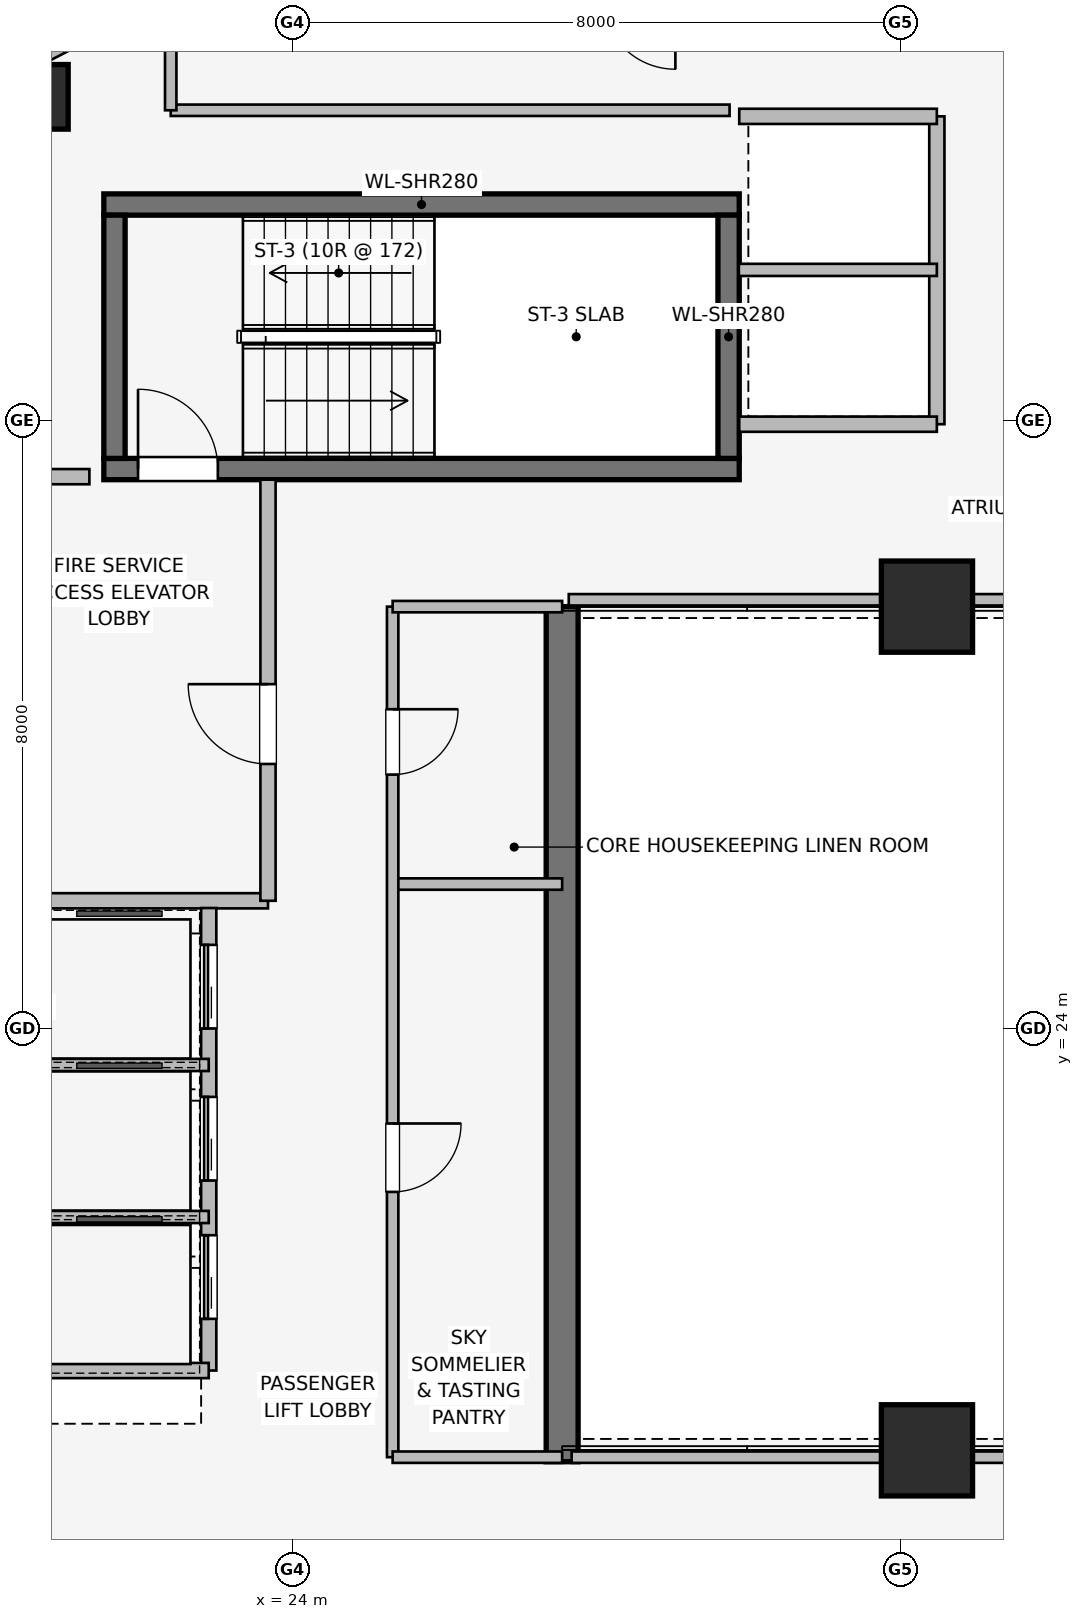
"""IFC4 building model, lengths in metres.
Left out: names, types, materials, properties, quantities, classifications, styles, units other than length and angle.
Written with IfcOpenShell. Run it as: python <this file> out.ifc"""

import sys

from ifc_helpers import new_model, si_unit, direction, frame, frame_2d, origin, origin_2d, place, context, subcontext, project, spatial, rectangle, extrude, element, fill, save


model = new_model("IFC4")
c1 = context("Model", 3, precision=1e-05, world=origin(), true_north=direction((0.0, 1.0)))
c2 = subcontext(c1, "Body", "Model", "MODEL_VIEW")
j1 = project(units=[si_unit("LENGTHUNIT", "METRE"), si_unit("PLANEANGLEUNIT", "RADIAN")], contexts=[c1])
p1 = place(None, origin())
s1 = spatial("IfcSite", under=j1, at=p1, CompositionType="ELEMENT")
p2 = place(p1, origin())
s2 = spatial("IfcBuilding", under=s1, at=p2, CompositionType="ELEMENT")
p3 = place(p2, frame((0.0, 0.0, 196.45)))
s3 = spatial("IfcBuildingStorey", under=s2, at=p3, CompositionType="ELEMENT", Elevation=196.45)
p4 = place(p3, frame((27.55, 29.55, 0.0), z_axis=(0.0, 0.0, 1.0), x_axis=(0.0, -1.0, 0.0)))
e1 = element("IfcWall", 1, at=p4, inside=s3, PredefinedType="SHEAR", context=c2, shape_type="SweptSolid", body=[
    extrude(rectangle(XDim=11.25, YDim=0.42, at=frame_2d((5.625, 0.0))), origin(), (0.0, 0.0, 1.0), 3.45),
])
p5 = place(p3, frame((21.52, 31.36, 0.0), z_axis=(0.0, 0.0, 1.0), x_axis=(1.0, 0.0, 0.0)))
e2 = element("IfcWall", 2, at=p5, inside=s3, PredefinedType="SHEAR", context=c2, shape_type="SweptSolid", body=[
    extrude(rectangle(XDim=8.36, YDim=0.28, at=frame_2d((4.18, 0.0))), origin(), (0.0, 0.0, 1.0), 3.45),
])
p6 = place(p5, frame((0.45, 0.0, 0.0)))
e3 = element("IfcOpeningElement", 3, at=p6, cuts=e2, PredefinedType="OPENING", context=c2, shape_type="SweptSolid", body=[
    extrude(rectangle(XDim=1.05, YDim=2.0, at=frame_2d((0.525, 1.0))), frame((0.0, 0.15, 0.0), z_axis=(0.0, -1.0, 0.0), x_axis=(1.0, 0.0, 0.0)), (0.0, 0.0, 1.0), 0.3),
])
p7 = place(p3, frame((29.88, 34.84, 0.0), z_axis=(0.0, 0.0, 1.0), x_axis=(-1.0, 0.0, 0.0)))
e4 = element("IfcWall", 4, at=p7, inside=s3, PredefinedType="SHEAR", context=c2, shape_type="SweptSolid", body=[
    extrude(rectangle(XDim=8.36, YDim=0.28, at=frame_2d((4.18, 0.0))), origin(), (0.0, 0.0, 1.0), 3.45),
])
for number, where, z_axis, x_axis in (
    (5, (21.66, 34.7, 0.0), (0.0, 0.0, 1.0), (0.0, -1.0, 0.0)),
    (6, (29.74, 31.5, 0.0), (0.0, 0.0, 1.0), (0.0, 1.0, 0.0)),
):
    element("IfcWall", number, at=place(p3, frame(where, z_axis=z_axis, x_axis=x_axis)), inside=s3, PredefinedType="SHEAR", context=c2, shape_type="SweptSolid", body=[
        extrude(rectangle(XDim=3.2, YDim=0.28, at=frame_2d((1.6, 0.0))), origin(), (0.0, 0.0, 1.0), 3.45),
    ])
for number, where, z_axis, x_axis in (
    (7, (32.35, 18.45, 0.0), (0.0, 0.0, 1.0), (1.0, 0.0, 0.0)),
    (8, (32.35, 29.55, 0.0), (0.0, 0.0, 1.0), (1.0, 0.0, 0.0)),
):
    element("IfcColumn", number, at=place(p3, frame(where, z_axis=z_axis, x_axis=x_axis)), inside=s3, PredefinedType="COLUMN", context=c2, shape_type="SweptSolid", body=[
        extrude(rectangle(XDim=1.2, YDim=1.2, at=origin_2d()), origin(), (0.0, 0.0, 1.0), 3.45),
    ])
p8 = place(p3, frame((20.626, 36.257, 0.0), z_axis=(0.0, 0.0, 1.0), x_axis=(1.0, 0.0, 0.0)))
e9 = element("IfcColumn", 9, at=p8, inside=s3, PredefinedType="COLUMN", context=c2, shape_type="SweptSolid", body=[
    extrude(rectangle(XDim=0.85, YDim=0.85, at=origin_2d()), origin(), (0.0, 0.0, 1.0), 3.45),
])
p9 = place(p3, frame((17.408, 35.153, 0.0), z_axis=(0.0, 0.0, 1.0), x_axis=(0.888626188278, 0.458632202867, 0.0)))
e10 = element("IfcWall", 10, at=p9, inside=s3, PredefinedType="STANDARD", context=c2, shape_type="SweptSolid", body=[
    extrude(rectangle(XDim=16.828, YDim=0.31, at=frame_2d((8.414, 0.0))), origin(), (0.0, 0.0, 1.0), 3.19),
])
p10 = place(p9, frame((0.675, 0.0, 0.75)))
e11 = element("IfcOpeningElement", 11, at=p10, cuts=e10, PredefinedType="OPENING", context=c2, shape_type="SweptSolid", body=[
    extrude(rectangle(XDim=2.0, YDim=1.5, at=frame_2d((1.0, 0.75))), frame((0.0, 0.165, 0.0), z_axis=(0.0, -1.0, 0.0), x_axis=(1.0, 0.0, 0.0)), (0.0, 0.0, 1.0), 0.33),
])
p11 = place(p9, frame((6.312, 0.0, 0.75)))
e12 = element("IfcOpeningElement", 12, at=p11, cuts=e10, PredefinedType="OPENING", context=c2, shape_type="SweptSolid", body=[
    extrude(rectangle(XDim=1.35, YDim=1.45, at=frame_2d((0.675, 0.725))), frame((0.0, 0.165, 0.0), z_axis=(0.0, -1.0, 0.0), x_axis=(1.0, 0.0, 0.0)), (0.0, 0.0, 1.0), 0.33),
])
p12 = place(p9, frame((8.676, 0.0, 0.75)))
e13 = element("IfcOpeningElement", 13, at=p12, cuts=e10, PredefinedType="OPENING", context=c2, shape_type="SweptSolid", body=[
    extrude(rectangle(XDim=1.35, YDim=1.45, at=frame_2d((0.675, 0.725))), frame((0.0, 0.165, 0.0), z_axis=(0.0, -1.0, 0.0), x_axis=(1.0, 0.0, 0.0)), (0.0, 0.0, 1.0), 0.33),
])
p13 = place(p9, frame((11.041, 0.0, 0.75)))
e14 = element("IfcOpeningElement", 14, at=p13, cuts=e10, PredefinedType="OPENING", context=c2, shape_type="SweptSolid", body=[
    extrude(rectangle(XDim=1.35, YDim=1.45, at=frame_2d((0.675, 0.725))), frame((0.0, 0.165, 0.0), z_axis=(0.0, -1.0, 0.0), x_axis=(1.0, 0.0, 0.0)), (0.0, 0.0, 1.0), 0.33),
])
p14 = place(p9, frame((14.153, 0.0, 0.75)))
e15 = element("IfcOpeningElement", 15, at=p14, cuts=e10, PredefinedType="OPENING", context=c2, shape_type="SweptSolid", body=[
    extrude(rectangle(XDim=2.0, YDim=1.5, at=frame_2d((1.0, 0.75))), frame((0.0, 0.165, 0.0), z_axis=(0.0, -1.0, 0.0), x_axis=(1.0, 0.0, 0.0)), (0.0, 0.0, 1.0), 0.33),
])
p15 = place(p3, frame((20.793, 25.68, 0.0), z_axis=(0.0, 0.0, 1.0), x_axis=(1.0, 0.0, 0.0)))
e16 = element("IfcWall", 16, at=p15, inside=s3, PredefinedType="PARTITIONING", context=c2, shape_type="SweptSolid", body=[
    extrude(rectangle(XDim=2.887, YDim=0.2, at=frame_2d((1.443, 0.0))), origin(), (0.0, 0.0, 1.0), 3.19),
])
p16 = place(p3, frame((23.68, 25.68, 0.0), z_axis=(0.0, 0.0, 1.0), x_axis=(0.0, 1.0, 0.0)))
e17 = element("IfcWall", 17, at=p16, inside=s3, PredefinedType="PARTITIONING", context=c2, shape_type="SweptSolid", body=[
    extrude(rectangle(XDim=5.54, YDim=0.2, at=frame_2d((2.77, 0.0))), origin(), (0.0, 0.0, 1.0), 3.19),
])
p17 = place(p16, frame((1.8, 0.0, 0.0)))
e18 = element("IfcOpeningElement", 18, at=p17, cuts=e17, PredefinedType="OPENING", context=c2, shape_type="SweptSolid", body=[
    extrude(rectangle(XDim=1.05, YDim=2.0, at=frame_2d((0.525, 1.0))), frame((0.0, 0.11, 0.0), z_axis=(0.0, -1.0, 0.0), x_axis=(1.0, 0.0, 0.0)), (0.0, 0.0, 1.0), 0.22),
])
p18 = place(p3, frame((21.33, 31.26, 0.0), z_axis=(0.0, 0.0, 1.0), x_axis=(-1.0, 0.0, 0.0)))
e19 = element("IfcWall", 19, at=p18, inside=s3, PredefinedType="PARTITIONING", context=c2, shape_type="SweptSolid", body=[
    extrude(rectangle(XDim=1.68, YDim=0.2, at=frame_2d((0.84, 0.0))), origin(), (0.0, 0.0, 1.0), 3.19),
])
p19 = place(p3, frame((32.48, 31.95, 0.0), z_axis=(0.0, 0.0, 1.0), x_axis=(0.0, 1.0, 0.0)))
e20 = element("IfcWall", 20, at=p19, inside=s3, PredefinedType="PARTITIONING", context=c2, shape_type="SweptSolid", body=[
    extrude(rectangle(XDim=4.05, YDim=0.2, at=frame_2d((2.025, 0.0))), origin(), (0.0, 0.0, 1.0), 3.19),
])
for number, where, z_axis, x_axis in (
    (21, (29.88, 36.0, 0.0), (0.0, 0.0, 1.0), (1.0, 0.0, 0.0)),
    (22, (32.48, 31.95, 0.0), (0.0, 0.0, 1.0), (-1.0, 0.0, 0.0)),
):
    element("IfcWall", number, at=place(p3, frame(where, z_axis=z_axis, x_axis=x_axis)), inside=s3, PredefinedType="PARTITIONING", context=c2, shape_type="SweptSolid", body=[
        extrude(rectangle(XDim=2.6, YDim=0.2, at=frame_2d((1.3, 0.0))), origin(), (0.0, 0.0, 1.0), 3.19),
    ])
p20 = place(p3, frame((29.875, 33.98, 0.0), z_axis=(0.0, 0.0, 1.0), x_axis=(1.0, 0.0, 0.0)))
e23 = element("IfcWall", 23, at=p20, inside=s3, PredefinedType="PARTITIONING", context=c2, shape_type="SweptSolid", body=[
    extrude(rectangle(XDim=2.605, YDim=0.16, at=frame_2d((1.302, 0.0))), origin(), (0.0, 0.0, 1.0), 2.582),
])
p21 = place(p3, frame((22.9, 19.5, 0.0), z_axis=(0.0, 0.0, 1.0), x_axis=(0.0, 1.0, 0.0)))
e24 = element("IfcWall", 24, at=p21, inside=s3, PredefinedType="PARTITIONING", context=c2, shape_type="SweptSolid", body=[
    extrude(rectangle(XDim=6.085, YDim=0.2, at=frame_2d((3.042, 0.0))), origin(), (0.0, 0.0, 1.0), 3.19),
])
p22 = place(p21, frame((0.68, 0.0, 0.0)))
e25 = element("IfcOpeningElement", 25, at=p22, cuts=e24, PredefinedType="OPENING", context=c2, shape_type="SweptSolid", body=[
    extrude(rectangle(XDim=1.1, YDim=2.2, at=frame_2d((0.55, 1.1))), frame((0.0, 0.11, 0.0), z_axis=(0.0, -1.0, 0.0), x_axis=(1.0, 0.0, 0.0)), (0.0, 0.0, 1.0), 0.22),
])
p23 = place(p21, frame((2.5, 0.0, 0.0)))
e26 = element("IfcOpeningElement", 26, at=p23, cuts=e24, PredefinedType="OPENING", context=c2, shape_type="SweptSolid", body=[
    extrude(rectangle(XDim=1.1, YDim=2.2, at=frame_2d((0.55, 1.1))), frame((0.0, 0.11, 0.0), z_axis=(0.0, -1.0, 0.0), x_axis=(1.0, 0.0, 0.0)), (0.0, 0.0, 1.0), 0.22),
])
p24 = place(p21, frame((4.5, 0.0, 0.0)))
e27 = element("IfcOpeningElement", 27, at=p24, cuts=e24, PredefinedType="OPENING", context=c2, shape_type="SweptSolid", body=[
    extrude(rectangle(XDim=1.1, YDim=2.2, at=frame_2d((0.55, 1.1))), frame((0.0, 0.11, 0.0), z_axis=(0.0, -1.0, 0.0), x_axis=(1.0, 0.0, 0.0)), (0.0, 0.0, 1.0), 0.22),
])
p25 = place(p3, frame((20.49, 19.5, 0.0), z_axis=(0.0, 0.0, 1.0), x_axis=(1.0, 0.0, 0.0)))
e28 = element("IfcWall", 28, at=p25, inside=s3, PredefinedType="PARTITIONING", context=c2, shape_type="SweptSolid", body=[
    extrude(rectangle(XDim=2.41, YDim=0.2, at=frame_2d((1.205, 0.0))), origin(), (0.0, 0.0, 1.0), 2.09),
])
for number, where, z_axis, x_axis in (
    (29, (20.55, 21.52, 0.0), (0.0, 0.0, 1.0), (1.0, 0.0, 0.0)),
    (30, (20.55, 23.52, 0.0), (0.0, 0.0, 1.0), (1.0, 0.0, 0.0)),
):
    element("IfcWall", number, at=place(p3, frame(where, z_axis=z_axis, x_axis=x_axis)), inside=s3, PredefinedType="PARTITIONING", context=c2, shape_type="SweptSolid", body=[
        extrude(rectangle(XDim=2.35, YDim=0.16, at=frame_2d((1.175, 0.0))), origin(), (0.0, 0.0, 1.0), 3.19),
    ])
p26 = place(p3, frame((25.32, 25.9, 0.0), z_axis=(0.0, 0.0, 1.0), x_axis=(1.0, 0.0, 0.0)))
e31 = element("IfcWall", 31, at=p26, inside=s3, PredefinedType="PARTITIONING", context=c2, shape_type="SweptSolid", body=[
    extrude(rectangle(XDim=2.23, YDim=0.15, at=frame_2d((1.115, 0.0))), origin(), (0.0, 0.0, 1.0), 3.19),
])
p27 = place(p3, frame((25.32, 29.55, 0.0), z_axis=(0.0, 0.0, 1.0), x_axis=(0.0, -1.0, 0.0)))
e32 = element("IfcWall", 32, at=p27, inside=s3, PredefinedType="PARTITIONING", context=c2, shape_type="SweptSolid", body=[
    extrude(rectangle(XDim=11.19, YDim=0.15, at=frame_2d((5.595, 0.0))), origin(), (0.0, 0.0, 1.0), 3.19),
])
p28 = place(p27, frame((1.35, 0.0, 0.0)))
e33 = element("IfcOpeningElement", 33, at=p28, cuts=e32, PredefinedType="OPENING", context=c2, shape_type="SweptSolid", body=[
    extrude(rectangle(XDim=0.86, YDim=2.0, at=frame_2d((0.43, 1.0))), frame((0.0, 0.085, 0.0), z_axis=(0.0, -1.0, 0.0), x_axis=(1.0, 0.0, 0.0)), (0.0, 0.0, 1.0), 0.17),
])
p29 = place(p27, frame((6.8, 0.0, 0.0)))
e34 = element("IfcOpeningElement", 34, at=p29, cuts=e32, PredefinedType="OPENING", context=c2, shape_type="SweptSolid", body=[
    extrude(rectangle(XDim=0.9, YDim=2.0, at=frame_2d((0.45, 1.0))), frame((0.0, 0.085, 0.0), z_axis=(0.0, -1.0, 0.0), x_axis=(1.0, 0.0, 0.0)), (0.0, 0.0, 1.0), 0.17),
])
p30 = place(p3, frame((25.32, 18.36, 0.0), z_axis=(0.0, 0.0, 1.0), x_axis=(1.0, 0.0, 0.0)))
e35 = element("IfcWall", 35, at=p30, inside=s3, PredefinedType="PARTITIONING", context=c2, shape_type="SweptSolid", body=[
    extrude(rectangle(XDim=2.23, YDim=0.15, at=frame_2d((1.115, 0.0))), origin(), (0.0, 0.0, 1.0), 3.19),
])
p31 = place(p3, frame((27.55, 29.55, 0.0), z_axis=(0.0, 0.0, 1.0), x_axis=(-1.0, 0.0, 0.0)))
e36 = element("IfcWall", 36, at=p31, inside=s3, PredefinedType="PARTITIONING", context=c2, shape_type="SweptSolid", body=[
    extrude(rectangle(XDim=2.23, YDim=0.15, at=frame_2d((1.115, 0.0))), origin(), (0.0, 0.0, 1.0), 2.09),
])
p32 = place(p3, frame((27.675, 18.36, 0.0), z_axis=(0.0, 0.0, 1.0), x_axis=(1.0, 0.0, 0.0)))
e37 = element("IfcWall", 37, at=p32, inside=s3, PredefinedType="PARTITIONING", context=c2, shape_type="SweptSolid", body=[
    extrude(rectangle(XDim=12.165, YDim=0.15, at=frame_2d((6.083, 0.0))), origin(), (0.0, 0.0, 1.0), 2.331),
])
p33 = place(p3, frame((39.84, 29.64, 0.0), z_axis=(0.0, 0.0, 1.0), x_axis=(-1.0, 0.0, 0.0)))
e38 = element("IfcWall", 38, at=p33, inside=s3, PredefinedType="PARTITIONING", context=c2, shape_type="SweptSolid", body=[
    extrude(rectangle(XDim=12.203, YDim=0.15, at=frame_2d((6.102, 0.0))), origin(), (0.0, 0.0, 1.0), 2.331),
])
p34 = place(p3, frame((29.753, 36.08, 0.0), z_axis=(0.0, 0.0, 1.0), x_axis=(-1.0, 0.0, 0.0)))
e39 = element("IfcWall", 39, at=p34, inside=s3, PredefinedType="PARTITIONING", context=c2, shape_type="SweptSolid", body=[
    extrude(rectangle(XDim=7.353, YDim=0.15, at=frame_2d((3.677, 0.0))), origin(), (0.0, 0.0, 1.0), 3.19),
])
p35 = place(p3, frame((22.4, 36.08, 0.0), z_axis=(0.0, 0.0, 1.0), x_axis=(0.0, 1.0, 0.0)))
e40 = element("IfcWall", 40, at=p35, inside=s3, PredefinedType="PARTITIONING", context=c2, shape_type="SweptSolid", body=[
    extrude(rectangle(XDim=1.43, YDim=0.15, at=frame_2d((0.715, 0.0))), origin(), (0.0, 0.0, 1.0), 3.19),
])
p36 = place(p6, origin())
e41 = element("IfcDoor", 41, at=p36, inside=s3, OperationType="SINGLE_SWING_LEFT", PredefinedType="DOOR", context=c2, shape_type="SweptSolid", body=[
    extrude(rectangle(XDim=1.05, YDim=2.0, at=frame_2d((0.525, 1.0))), frame((0.0, 0.025, 0.0), z_axis=(0.0, -1.0, 0.0), x_axis=(1.0, 0.0, 0.0)), (0.0, 0.0, 1.0), 0.05),
])
fill(e3, e41)
p37 = place(p17, origin())
e42 = element("IfcDoor", 42, at=p37, inside=s3, OperationType="SINGLE_SWING_RIGHT", PredefinedType="DOOR", context=c2, shape_type="SweptSolid", body=[
    extrude(rectangle(XDim=1.05, YDim=2.0, at=frame_2d((0.525, 1.0))), frame((0.0, 0.025, 0.0), z_axis=(0.0, -1.0, 0.0), x_axis=(1.0, 0.0, 0.0)), (0.0, 0.0, 1.0), 0.05),
])
fill(e18, e42)
p38 = place(p22, origin())
e43 = element("IfcDoor", 43, at=p38, inside=s3, OperationType="SLIDING_TO_LEFT", PredefinedType="DOOR", context=c2, shape_type="SweptSolid", body=[
    extrude(rectangle(XDim=1.1, YDim=2.2, at=frame_2d((0.55, 1.1))), frame((0.0, 0.025, 0.0), z_axis=(0.0, -1.0, 0.0), x_axis=(1.0, 0.0, 0.0)), (0.0, 0.0, 1.0), 0.05),
])
fill(e25, e43)
p39 = place(p23, origin())
e44 = element("IfcDoor", 44, at=p39, inside=s3, OperationType="SLIDING_TO_LEFT", PredefinedType="DOOR", context=c2, shape_type="SweptSolid", body=[
    extrude(rectangle(XDim=1.1, YDim=2.2, at=frame_2d((0.55, 1.1))), frame((0.0, 0.025, 0.0), z_axis=(0.0, -1.0, 0.0), x_axis=(1.0, 0.0, 0.0)), (0.0, 0.0, 1.0), 0.05),
])
fill(e26, e44)
p40 = place(p24, origin())
e45 = element("IfcDoor", 45, at=p40, inside=s3, OperationType="SLIDING_TO_LEFT", PredefinedType="DOOR", context=c2, shape_type="SweptSolid", body=[
    extrude(rectangle(XDim=1.1, YDim=2.2, at=frame_2d((0.55, 1.1))), frame((0.0, 0.025, 0.0), z_axis=(0.0, -1.0, 0.0), x_axis=(1.0, 0.0, 0.0)), (0.0, 0.0, 1.0), 0.05),
])
fill(e27, e45)
p41 = place(p28, origin())
e46 = element("IfcDoor", 46, at=p41, inside=s3, OperationType="SINGLE_SWING_LEFT", PredefinedType="DOOR", context=c2, shape_type="SweptSolid", body=[
    extrude(rectangle(XDim=0.86, YDim=2.0, at=frame_2d((0.43, 1.0))), frame((0.0, 0.025, 0.0), z_axis=(0.0, -1.0, 0.0), x_axis=(1.0, 0.0, 0.0)), (0.0, 0.0, 1.0), 0.05),
])
fill(e33, e46)
p42 = place(p29, origin())
e47 = element("IfcDoor", 47, at=p42, inside=s3, OperationType="SINGLE_SWING_LEFT", PredefinedType="DOOR", context=c2, shape_type="SweptSolid", body=[
    extrude(rectangle(XDim=0.9, YDim=2.0, at=frame_2d((0.45, 1.0))), frame((0.0, 0.025, 0.0), z_axis=(0.0, -1.0, 0.0), x_axis=(1.0, 0.0, 0.0)), (0.0, 0.0, 1.0), 0.05),
])
fill(e34, e47)
save(model, sys.argv[1])
